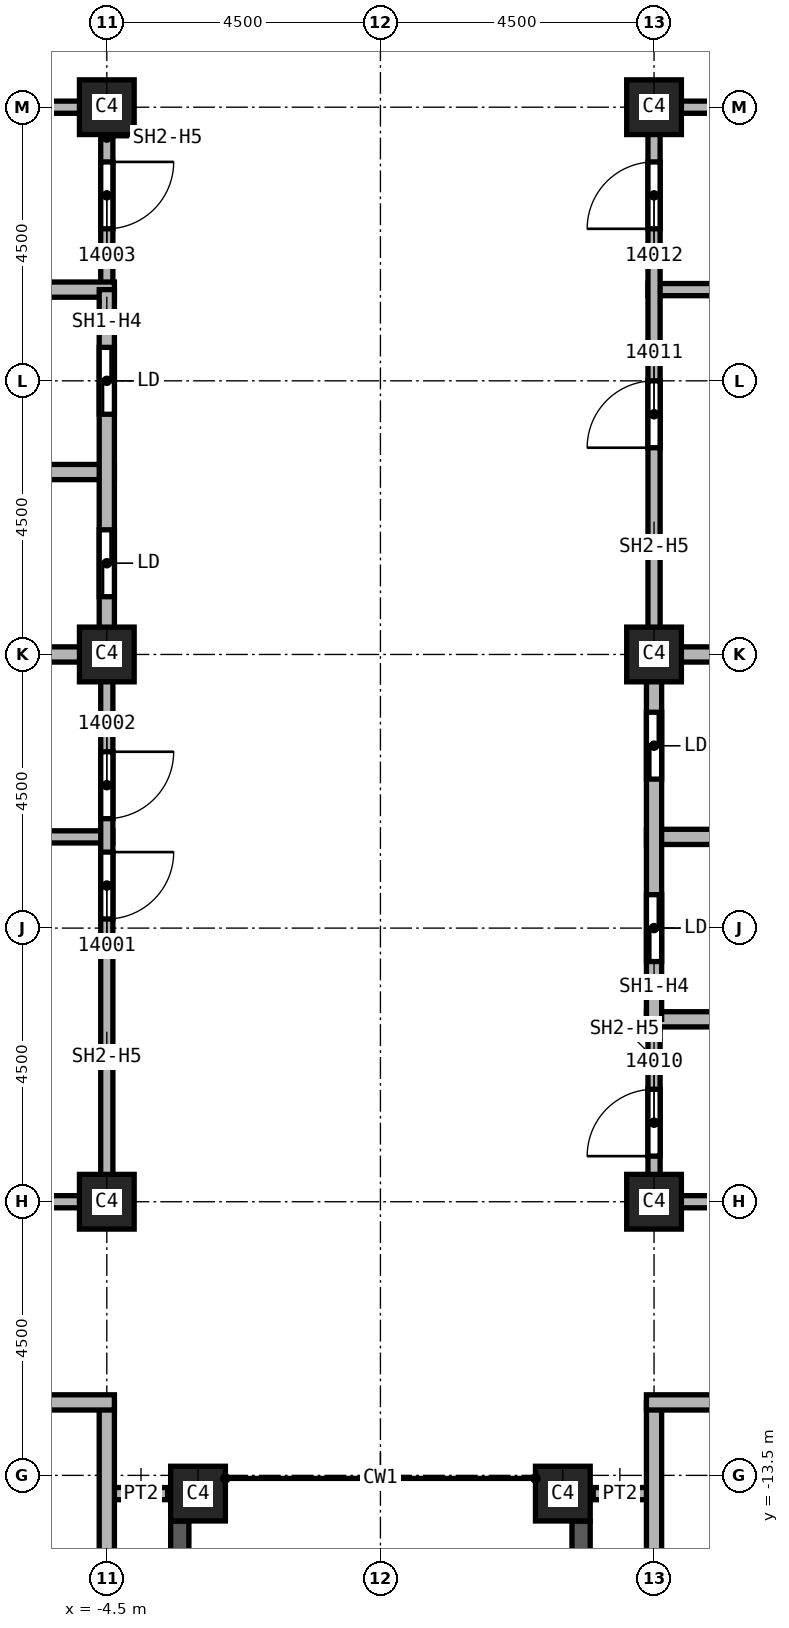
"""IFC4 building model, lengths in metres.
Left out: names, types, materials, properties, quantities, classifications, styles, units other than length and angle.
Written with IfcOpenShell. Run it as: python <this file> out.ifc"""

import sys

from ifc_helpers import new_model, si_unit, direction, frame, frame_2d, origin, origin_2d, place, context, subcontext, project, spatial, rectangle, extrude, element, fill, save


model = new_model("IFC4")
c1 = context("Model", 3, precision=1e-05, world=origin(), true_north=direction((0.0, 1.0)))
c2 = subcontext(c1, "Body", "Model", "MODEL_VIEW")
j1 = project(units=[si_unit("LENGTHUNIT", "METRE"), si_unit("PLANEANGLEUNIT", "RADIAN")], contexts=[c1])
p1 = place(None, origin())
s1 = spatial("IfcSite", under=j1, at=p1, CompositionType="ELEMENT")
p2 = place(p1, origin())
s2 = spatial("IfcBuilding", under=s1, at=p2, CompositionType="ELEMENT")
p3 = place(p2, frame((0.0, 0.0, 224.0)))
s3 = spatial("IfcBuildingStorey", under=s2, at=p3, CompositionType="ELEMENT", Elevation=224.0)
for number, where, z_axis, x_axis in (
    (1, (4.5, 0.0, 0.0), (0.0, 0.0, 1.0), (1.0, 0.0, 0.0)),
    (2, (4.5, 9.0, 0.0), (0.0, 0.0, 1.0), (1.0, 0.0, 0.0)),
    (3, (4.5, -9.0, 0.0), (0.0, 0.0, 1.0), (1.0, 0.0, 0.0)),
    (4, (-4.5, 0.0, 0.0), (0.0, 0.0, 1.0), (1.0, 0.0, 0.0)),
    (5, (-4.5, 9.0, 0.0), (0.0, 0.0, 1.0), (1.0, 0.0, 0.0)),
    (6, (-4.5, -9.0, 0.0), (0.0, 0.0, 1.0), (1.0, 0.0, 0.0)),
    (7, (3.0, -13.8, 0.0), (0.0, 0.0, 1.0), (1.0, 0.0, 0.0)),
    (8, (-3.0, -13.8, 0.0), (0.0, 0.0, 1.0), (1.0, 0.0, 0.0)),
):
    element("IfcColumn", number, at=place(p3, frame(where, z_axis=z_axis, x_axis=x_axis)), inside=s3, PredefinedType="COLUMN", context=c2, shape_type="SweptSolid", body=[
        extrude(rectangle(XDim=0.9, YDim=0.9, at=origin_2d()), origin(), (0.0, 0.0, 1.0), 3.72),
    ])
p4 = place(p3, frame((-3.3, -22.3, 0.0), z_axis=(0.0, 0.0, 1.0), x_axis=(0.0, 1.0, 0.0)))
e9 = element("IfcWall", 9, at=p4, inside=s3, PredefinedType="SOLIDWALL", context=c2, shape_type="SweptSolid", body=[
    extrude(rectangle(XDim=8.05, YDim=0.3, at=frame_2d((4.025, 0.0))), origin(), (0.0, 0.0, 1.0), 3.12),
])
p5 = place(p4, frame((0.812, 0.0, 0.8)))
e10 = element("IfcOpeningElement", 10, at=p5, cuts=e9, PredefinedType="OPENING", context=c2, shape_type="SweptSolid", body=[
    extrude(rectangle(XDim=2.4, YDim=1.95, at=frame_2d((1.2, 0.975))), frame((0.0, 0.15, 0.0), z_axis=(0.0, -1.0, 0.0), x_axis=(1.0, 0.0, 0.0)), (0.0, 0.0, 1.0), 0.3),
])
p6 = place(p4, frame((4.837, 0.0, 0.8)))
e11 = element("IfcOpeningElement", 11, at=p6, cuts=e9, PredefinedType="OPENING", context=c2, shape_type="SweptSolid", body=[
    extrude(rectangle(XDim=2.4, YDim=1.95, at=frame_2d((1.2, 0.975))), frame((0.0, 0.15, 0.0), z_axis=(0.0, -1.0, 0.0), x_axis=(1.0, 0.0, 0.0)), (0.0, 0.0, 1.0), 0.3),
])
p7 = place(p3, frame((3.3, -14.25, 0.0), z_axis=(0.0, 0.0, 1.0), x_axis=(0.0, -1.0, 0.0)))
e12 = element("IfcWall", 12, at=p7, inside=s3, PredefinedType="SOLIDWALL", context=c2, shape_type="SweptSolid", body=[
    extrude(rectangle(XDim=8.05, YDim=0.3, at=frame_2d((4.025, 0.0))), origin(), (0.0, 0.0, 1.0), 3.12),
])
p8 = place(p7, frame((0.812, 0.0, 0.8)))
e13 = element("IfcOpeningElement", 13, at=p8, cuts=e12, PredefinedType="OPENING", context=c2, shape_type="SweptSolid", body=[
    extrude(rectangle(XDim=2.4, YDim=1.95, at=frame_2d((1.2, 0.975))), frame((0.0, 0.15, 0.0), z_axis=(0.0, -1.0, 0.0), x_axis=(1.0, 0.0, 0.0)), (0.0, 0.0, 1.0), 0.3),
])
p9 = place(p7, frame((4.837, 0.0, 0.8)))
e14 = element("IfcOpeningElement", 14, at=p9, cuts=e12, PredefinedType="OPENING", context=c2, shape_type="SweptSolid", body=[
    extrude(rectangle(XDim=2.4, YDim=1.95, at=frame_2d((1.2, 0.975))), frame((0.0, 0.15, 0.0), z_axis=(0.0, -1.0, 0.0), x_axis=(1.0, 0.0, 0.0)), (0.0, 0.0, 1.0), 0.3),
])
for number, where, z_axis, x_axis in (
    (15, (-3.5, -13.8, 0.0), (0.0, 0.0, 1.0), (-1.0, 0.0, 0.0)),
    (16, (4.5, -13.8, 0.0), (0.0, 0.0, 1.0), (-1.0, 0.0, 0.0)),
):
    element("IfcWall", number, at=place(p3, frame(where, z_axis=z_axis, x_axis=x_axis)), inside=s3, PredefinedType="PARTITIONING", context=c2, shape_type="SweptSolid", body=[
        extrude(rectangle(XDim=1.0, YDim=0.2, at=frame_2d((0.5, 0.0))), origin(), (0.0, 0.0, 1.0), 3.72),
    ])
p10 = place(p3, frame((-7.625, -3.0, 0.0), z_axis=(0.0, 0.0, 1.0), x_axis=(1.0, 0.0, 0.0)))
e17 = element("IfcWall", 17, at=p10, inside=s3, PredefinedType="SOLIDWALL", context=c2, shape_type="SweptSolid", body=[
    extrude(rectangle(XDim=3.225, YDim=0.2, at=frame_2d((1.613, 0.0))), origin(), (0.0, 0.0, 1.0), 3.72),
])
for number, where, z_axis, x_axis in (
    (18, (-7.5, 9.0, 0.0), (0.0, 0.0, 1.0), (1.0, 0.0, 0.0)),
    (19, (-4.5, -9.0, 0.0), (0.0, 0.0, 1.0), (-1.0, 0.0, 0.0)),
):
    element("IfcWall", number, at=place(p3, frame(where, z_axis=z_axis, x_axis=x_axis)), inside=s3, PredefinedType="SOLIDWALL", context=c2, shape_type="SweptSolid", body=[
        extrude(rectangle(XDim=3.0, YDim=0.2, at=frame_2d((1.5, 0.0))), origin(), (0.0, 0.0, 1.0), 2.958),
    ])
p11 = place(p3, frame((-4.5, 0.0, 0.0), z_axis=(0.0, 0.0, 1.0), x_axis=(0.0, -1.0, 0.0)))
e20 = element("IfcWall", 20, at=p11, inside=s3, PredefinedType="SOLIDWALL", context=c2, shape_type="SweptSolid", body=[
    extrude(rectangle(XDim=9.1, YDim=0.2, at=frame_2d((4.55, 0.0))), origin(), (0.0, 0.0, 1.0), 2.958),
])
p12 = place(p11, frame((3.25, 0.0, 0.0)))
e21 = element("IfcOpeningElement", 21, at=p12, cuts=e20, PredefinedType="OPENING", context=c2, shape_type="SweptSolid", body=[
    extrude(rectangle(XDim=1.1, YDim=2.1, at=frame_2d((0.55, 1.05))), frame((0.0, 0.1, 0.0), z_axis=(0.0, -1.0, 0.0), x_axis=(1.0, 0.0, 0.0)), (0.0, 0.0, 1.0), 0.2),
])
p13 = place(p11, frame((1.6, 0.0, 0.0)))
e22 = element("IfcOpeningElement", 22, at=p13, cuts=e20, PredefinedType="OPENING", context=c2, shape_type="SweptSolid", body=[
    extrude(rectangle(XDim=1.1, YDim=2.1, at=frame_2d((0.55, 1.05))), frame((0.0, 0.1, 0.0), z_axis=(0.0, -1.0, 0.0), x_axis=(1.0, 0.0, 0.0)), (0.0, 0.0, 1.0), 0.2),
])
p14 = place(p3, frame((-4.5, 9.1, 0.0), z_axis=(0.0, 0.0, 1.0), x_axis=(0.0, -1.0, 0.0)))
e23 = element("IfcWall", 23, at=p14, inside=s3, PredefinedType="SOLIDWALL", context=c2, shape_type="SweptSolid", body=[
    extrude(rectangle(XDim=3.1, YDim=0.2, at=frame_2d((1.55, 0.0))), origin(), (0.0, 0.0, 1.0), 2.958),
])
p15 = place(p14, frame((1.0, 0.0, 0.0)))
e24 = element("IfcOpeningElement", 24, at=p15, cuts=e23, PredefinedType="OPENING", context=c2, shape_type="SweptSolid", body=[
    extrude(rectangle(XDim=1.1, YDim=2.1, at=frame_2d((0.55, 1.05))), frame((0.0, 0.1, 0.0), z_axis=(0.0, -1.0, 0.0), x_axis=(1.0, 0.0, 0.0)), (0.0, 0.0, 1.0), 0.2),
])
p16 = place(p3, frame((4.4, 6.0, 0.0), z_axis=(0.0, 0.0, 1.0), x_axis=(1.0, 0.0, 0.0)))
e25 = element("IfcWall", 25, at=p16, inside=s3, PredefinedType="SOLIDWALL", context=c2, shape_type="SweptSolid", body=[
    extrude(rectangle(XDim=3.2, YDim=0.2, at=frame_2d((1.6, 0.0))), origin(), (0.0, 0.0, 1.0), 3.72),
])
p17 = place(p3, frame((4.5, -9.1, 0.0), z_axis=(0.0, 0.0, 1.0), x_axis=(0.0, 1.0, 0.0)))
e26 = element("IfcWall", 26, at=p17, inside=s3, PredefinedType="SOLIDWALL", context=c2, shape_type="SweptSolid", body=[
    extrude(rectangle(XDim=3.1, YDim=0.2, at=frame_2d((1.55, 0.0))), origin(), (0.0, 0.0, 1.0), 2.958),
])
p18 = place(p17, frame((0.85, 0.0, 0.0)))
e27 = element("IfcOpeningElement", 27, at=p18, cuts=e26, PredefinedType="OPENING", context=c2, shape_type="SweptSolid", body=[
    extrude(rectangle(XDim=1.1, YDim=2.1, at=frame_2d((0.55, 1.05))), frame((0.0, 0.1, 0.0), z_axis=(0.0, -1.0, 0.0), x_axis=(1.0, 0.0, 0.0)), (0.0, 0.0, 1.0), 0.2),
])
p19 = place(p3, frame((4.5, 0.0, 0.0), z_axis=(0.0, 0.0, 1.0), x_axis=(0.0, 1.0, 0.0)))
e28 = element("IfcWall", 28, at=p19, inside=s3, PredefinedType="SOLIDWALL", context=c2, shape_type="SweptSolid", body=[
    extrude(rectangle(XDim=9.1, YDim=0.2, at=frame_2d((4.55, 0.0))), origin(), (0.0, 0.0, 1.0), 2.958),
])
p20 = place(p19, frame((3.4, 0.0, 0.0)))
e29 = element("IfcOpeningElement", 29, at=p20, cuts=e28, PredefinedType="OPENING", context=c2, shape_type="SweptSolid", body=[
    extrude(rectangle(XDim=1.1, YDim=2.1, at=frame_2d((0.55, 1.05))), frame((0.0, 0.1, 0.0), z_axis=(0.0, -1.0, 0.0), x_axis=(1.0, 0.0, 0.0)), (0.0, 0.0, 1.0), 0.2),
])
p21 = place(p19, frame((7.0, 0.0, 0.0)))
e30 = element("IfcOpeningElement", 30, at=p21, cuts=e28, PredefinedType="OPENING", context=c2, shape_type="SweptSolid", body=[
    extrude(rectangle(XDim=1.1, YDim=2.1, at=frame_2d((0.55, 1.05))), frame((0.0, 0.1, 0.0), z_axis=(0.0, -1.0, 0.0), x_axis=(1.0, 0.0, 0.0)), (0.0, 0.0, 1.0), 0.2),
])
for number, where, z_axis, x_axis in (
    (31, (4.5, 9.0, 0.0), (0.0, 0.0, 1.0), (1.0, 0.0, 0.0)),
    (32, (7.5, -9.0, 0.0), (0.0, 0.0, 1.0), (-1.0, 0.0, 0.0)),
):
    element("IfcWall", number, at=place(p3, frame(where, z_axis=z_axis, x_axis=x_axis)), inside=s3, PredefinedType="SOLIDWALL", context=c2, shape_type="SweptSolid", body=[
        extrude(rectangle(XDim=3.0, YDim=0.2, at=frame_2d((1.5, 0.0))), origin(), (0.0, 0.0, 1.0), 2.958),
    ])
p22 = place(p3, frame((-13.625, 3.0, 0.0), z_axis=(0.0, 0.0, 1.0), x_axis=(1.0, 0.0, 0.0)))
e33 = element("IfcWall", 33, at=p22, inside=s3, PredefinedType="SOLIDWALL", context=c2, shape_type="SweptSolid", body=[
    extrude(rectangle(XDim=9.25, YDim=0.25, at=frame_2d((4.625, 0.0))), origin(), (0.0, 0.0, 1.0), 3.72),
])
p23 = place(p22, frame((3.25, 0.0, 0.0)))
e34 = element("IfcOpeningElement", 34, at=p23, cuts=e33, PredefinedType="OPENING", context=c2, shape_type="SweptSolid", body=[
    extrude(rectangle(XDim=1.1, YDim=2.1, at=frame_2d((0.55, 1.05))), frame((0.0, 0.125, 0.0), z_axis=(0.0, -1.0, 0.0), x_axis=(1.0, 0.0, 0.0)), (0.0, 0.0, 1.0), 0.25),
])
for number, where, z_axis, x_axis in (
    (35, (-7.625, 0.0, 0.0), (0.0, 0.0, 1.0), (1.0, 0.0, 0.0)),
    (36, (-7.625, 6.0, 0.0), (0.0, 0.0, 1.0), (1.0, 0.0, 0.0)),
):
    element("IfcWall", number, at=place(p3, frame(where, z_axis=z_axis, x_axis=x_axis)), inside=s3, PredefinedType="SOLIDWALL", context=c2, shape_type="SweptSolid", body=[
        extrude(rectangle(XDim=3.25, YDim=0.25, at=frame_2d((1.625, 0.0))), origin(), (0.0, 0.0, 1.0), 3.72),
    ])
p24 = place(p3, frame((-4.5, 6.0, 0.0), z_axis=(0.0, 0.0, 1.0), x_axis=(0.0, -1.0, 0.0)))
e37 = element("IfcWall", 37, at=p24, inside=s3, PredefinedType="SOLIDWALL", context=c2, shape_type="SweptSolid", body=[
    extrude(rectangle(XDim=6.0, YDim=0.25, at=frame_2d((3.0, 0.0))), origin(), (0.0, 0.0, 1.0), 2.958),
])
p25 = place(p24, frame((3.95, 0.0, 0.0)))
e38 = element("IfcOpeningElement", 38, at=p25, cuts=e37, PredefinedType="OPENING", context=c2, shape_type="SweptSolid", body=[
    extrude(rectangle(XDim=1.1, YDim=2.1, at=frame_2d((0.55, 1.05))), frame((0.0, 0.125, 0.0), z_axis=(0.0, -1.0, 0.0), x_axis=(1.0, 0.0, 0.0)), (0.0, 0.0, 1.0), 0.25),
])
p26 = place(p24, frame((0.95, 0.0, 0.0)))
e39 = element("IfcOpeningElement", 39, at=p26, cuts=e37, PredefinedType="OPENING", context=c2, shape_type="SweptSolid", body=[
    extrude(rectangle(XDim=1.1, YDim=2.1, at=frame_2d((0.55, 1.05))), frame((0.0, 0.125, 0.0), z_axis=(0.0, -1.0, 0.0), x_axis=(1.0, 0.0, 0.0)), (0.0, 0.0, 1.0), 0.25),
])
p27 = place(p3, frame((4.375, -6.0, 0.0), z_axis=(0.0, 0.0, 1.0), x_axis=(1.0, 0.0, 0.0)))
e40 = element("IfcWall", 40, at=p27, inside=s3, PredefinedType="SOLIDWALL", context=c2, shape_type="SweptSolid", body=[
    extrude(rectangle(XDim=3.25, YDim=0.25, at=frame_2d((1.625, 0.0))), origin(), (0.0, 0.0, 1.0), 3.72),
])
p28 = place(p3, frame((4.375, -3.0, 0.0), z_axis=(0.0, 0.0, 1.0), x_axis=(1.0, 0.0, 0.0)))
e41 = element("IfcWall", 41, at=p28, inside=s3, PredefinedType="SOLIDWALL", context=c2, shape_type="SweptSolid", body=[
    extrude(rectangle(XDim=9.25, YDim=0.25, at=frame_2d((4.625, 0.0))), origin(), (0.0, 0.0, 1.0), 3.72),
])
p29 = place(p28, frame((3.375, 0.0, 0.0)))
e42 = element("IfcOpeningElement", 42, at=p29, cuts=e41, PredefinedType="OPENING", context=c2, shape_type="SweptSolid", body=[
    extrude(rectangle(XDim=1.1, YDim=2.1, at=frame_2d((0.55, 1.05))), frame((0.0, 0.125, 0.0), z_axis=(0.0, -1.0, 0.0), x_axis=(1.0, 0.0, 0.0)), (0.0, 0.0, 1.0), 0.25),
])
p30 = place(p3, frame((4.375, 0.0, 0.0), z_axis=(0.0, 0.0, 1.0), x_axis=(1.0, 0.0, 0.0)))
e43 = element("IfcWall", 43, at=p30, inside=s3, PredefinedType="SOLIDWALL", context=c2, shape_type="SweptSolid", body=[
    extrude(rectangle(XDim=3.25, YDim=0.25, at=frame_2d((1.625, 0.0))), origin(), (0.0, 0.0, 1.0), 3.72),
])
p31 = place(p3, frame((4.5, -6.0, 0.0), z_axis=(0.0, 0.0, 1.0), x_axis=(0.0, 1.0, 0.0)))
e44 = element("IfcWall", 44, at=p31, inside=s3, PredefinedType="SOLIDWALL", context=c2, shape_type="SweptSolid", body=[
    extrude(rectangle(XDim=6.0, YDim=0.25, at=frame_2d((3.0, 0.0))), origin(), (0.0, 0.0, 1.0), 2.958),
])
p32 = place(p31, frame((0.95, 0.0, 0.0)))
e45 = element("IfcOpeningElement", 45, at=p32, cuts=e44, PredefinedType="OPENING", context=c2, shape_type="SweptSolid", body=[
    extrude(rectangle(XDim=1.1, YDim=2.1, at=frame_2d((0.55, 1.05))), frame((0.0, 0.125, 0.0), z_axis=(0.0, -1.0, 0.0), x_axis=(1.0, 0.0, 0.0)), (0.0, 0.0, 1.0), 0.25),
])
p33 = place(p31, frame((3.95, 0.0, 0.0)))
e46 = element("IfcOpeningElement", 46, at=p33, cuts=e44, PredefinedType="OPENING", context=c2, shape_type="SweptSolid", body=[
    extrude(rectangle(XDim=1.1, YDim=2.1, at=frame_2d((0.55, 1.05))), frame((0.0, 0.125, 0.0), z_axis=(0.0, -1.0, 0.0), x_axis=(1.0, 0.0, 0.0)), (0.0, 0.0, 1.0), 0.25),
])
p34 = place(p3, frame((-4.5, -12.3, 0.0), z_axis=(0.0, 0.0, 1.0), x_axis=(0.0, -1.0, 0.0)))
e47 = element("IfcWall", 47, at=p34, inside=s3, PredefinedType="SOLIDWALL", context=c2, shape_type="SweptSolid", body=[
    extrude(rectangle(XDim=4.625, YDim=0.25, at=frame_2d((2.312, 0.0))), origin(), (0.0, 0.0, 1.0), 3.72),
])
p35 = place(p3, frame((-4.375, -12.3, 0.0), z_axis=(0.0, 0.0, 1.0), x_axis=(-1.0, 0.0, 0.0)))
e48 = element("IfcWall", 48, at=p35, inside=s3, PredefinedType="SOLIDWALL", context=c2, shape_type="SweptSolid", body=[
    extrude(rectangle(XDim=9.25, YDim=0.25, at=frame_2d((4.625, 0.0))), origin(), (0.0, 0.0, 1.0), 3.72),
])
p36 = place(p35, frame((7.2, 0.0, 0.0)))
e49 = element("IfcOpeningElement", 49, at=p36, cuts=e48, PredefinedType="OPENING", context=c2, shape_type="SweptSolid", body=[
    extrude(rectangle(XDim=1.2, YDim=2.1, at=frame_2d((0.6, 1.05))), frame((0.0, 0.125, 0.0), z_axis=(0.0, -1.0, 0.0), x_axis=(1.0, 0.0, 0.0)), (0.0, 0.0, 1.0), 0.25),
])
p37 = place(p3, frame((4.5, -16.8, 0.0), z_axis=(0.0, 0.0, 1.0), x_axis=(0.0, 1.0, 0.0)))
e50 = element("IfcWall", 50, at=p37, inside=s3, PredefinedType="SOLIDWALL", context=c2, shape_type="SweptSolid", body=[
    extrude(rectangle(XDim=4.5, YDim=0.25, at=frame_2d((2.25, 0.0))), origin(), (0.0, 0.0, 1.0), 3.72),
])
p38 = place(p3, frame((13.625, -12.3, 0.0), z_axis=(0.0, 0.0, 1.0), x_axis=(-1.0, 0.0, 0.0)))
e51 = element("IfcWall", 51, at=p38, inside=s3, PredefinedType="SOLIDWALL", context=c2, shape_type="SweptSolid", body=[
    extrude(rectangle(XDim=9.25, YDim=0.25, at=frame_2d((4.625, 0.0))), origin(), (0.0, 0.0, 1.0), 3.72),
])
p39 = place(p38, frame((0.85, 0.0, 0.0)))
e52 = element("IfcOpeningElement", 52, at=p39, cuts=e51, PredefinedType="OPENING", context=c2, shape_type="SweptSolid", body=[
    extrude(rectangle(XDim=1.2, YDim=2.1, at=frame_2d((0.6, 1.05))), frame((0.0, 0.125, 0.0), z_axis=(0.0, -1.0, 0.0), x_axis=(1.0, 0.0, 0.0)), (0.0, 0.0, 1.0), 0.25),
])
p40 = place(p12, origin())
e53 = element("IfcDoor", 53, at=p40, inside=s3, OperationType="SINGLE_SWING_RIGHT", PredefinedType="DOOR", context=c2, shape_type="SweptSolid", body=[
    extrude(rectangle(XDim=1.1, YDim=2.1, at=frame_2d((0.55, 1.05))), frame((0.0, 0.025, 0.0), z_axis=(0.0, -1.0, 0.0), x_axis=(1.0, 0.0, 0.0)), (0.0, 0.0, 1.0), 0.05),
])
fill(e21, e53)
p41 = place(p13, origin())
e54 = element("IfcDoor", 54, at=p41, inside=s3, OperationType="SINGLE_SWING_LEFT", PredefinedType="DOOR", context=c2, shape_type="SweptSolid", body=[
    extrude(rectangle(XDim=1.1, YDim=2.1, at=frame_2d((0.55, 1.05))), frame((0.0, 0.025, 0.0), z_axis=(0.0, -1.0, 0.0), x_axis=(1.0, 0.0, 0.0)), (0.0, 0.0, 1.0), 0.05),
])
fill(e22, e54)
p42 = place(p15, origin())
e55 = element("IfcDoor", 55, at=p42, inside=s3, OperationType="SINGLE_SWING_RIGHT", PredefinedType="DOOR", context=c2, shape_type="SweptSolid", body=[
    extrude(rectangle(XDim=1.1, YDim=2.1, at=frame_2d((0.55, 1.05))), frame((0.0, 0.025, 0.0), z_axis=(0.0, -1.0, 0.0), x_axis=(1.0, 0.0, 0.0)), (0.0, 0.0, 1.0), 0.05),
])
fill(e24, e55)
p43 = place(p18, origin())
e56 = element("IfcDoor", 56, at=p43, inside=s3, OperationType="SINGLE_SWING_LEFT", PredefinedType="DOOR", context=c2, shape_type="SweptSolid", body=[
    extrude(rectangle(XDim=1.1, YDim=2.1, at=frame_2d((0.55, 1.05))), frame((0.0, 0.025, 0.0), z_axis=(0.0, -1.0, 0.0), x_axis=(1.0, 0.0, 0.0)), (0.0, 0.0, 1.0), 0.05),
])
fill(e27, e56)
p44 = place(p20, origin())
e57 = element("IfcDoor", 57, at=p44, inside=s3, OperationType="SINGLE_SWING_RIGHT", PredefinedType="DOOR", context=c2, shape_type="SweptSolid", body=[
    extrude(rectangle(XDim=1.1, YDim=2.1, at=frame_2d((0.55, 1.05))), frame((0.0, 0.025, 0.0), z_axis=(0.0, -1.0, 0.0), x_axis=(1.0, 0.0, 0.0)), (0.0, 0.0, 1.0), 0.05),
])
fill(e29, e57)
p45 = place(p21, origin())
e58 = element("IfcDoor", 58, at=p45, inside=s3, OperationType="SINGLE_SWING_LEFT", PredefinedType="DOOR", context=c2, shape_type="SweptSolid", body=[
    extrude(rectangle(XDim=1.1, YDim=2.1, at=frame_2d((0.55, 1.05))), frame((0.0, 0.025, 0.0), z_axis=(0.0, -1.0, 0.0), x_axis=(1.0, 0.0, 0.0)), (0.0, 0.0, 1.0), 0.05),
])
fill(e30, e58)
p46 = place(p25, origin())
e59 = element("IfcDoor", 59, at=p46, inside=s3, OperationType="SLIDING_TO_LEFT", PredefinedType="DOOR", context=c2, shape_type="SweptSolid", body=[
    extrude(rectangle(XDim=1.1, YDim=2.1, at=frame_2d((0.55, 1.05))), frame((0.0, 0.025, 0.0), z_axis=(0.0, -1.0, 0.0), x_axis=(1.0, 0.0, 0.0)), (0.0, 0.0, 1.0), 0.05),
])
fill(e38, e59)
p47 = place(p26, origin())
e60 = element("IfcDoor", 60, at=p47, inside=s3, OperationType="SLIDING_TO_LEFT", PredefinedType="DOOR", context=c2, shape_type="SweptSolid", body=[
    extrude(rectangle(XDim=1.1, YDim=2.1, at=frame_2d((0.55, 1.05))), frame((0.0, 0.025, 0.0), z_axis=(0.0, -1.0, 0.0), x_axis=(1.0, 0.0, 0.0)), (0.0, 0.0, 1.0), 0.05),
])
fill(e39, e60)
p48 = place(p32, origin())
e61 = element("IfcDoor", 61, at=p48, inside=s3, OperationType="SLIDING_TO_LEFT", PredefinedType="DOOR", context=c2, shape_type="SweptSolid", body=[
    extrude(rectangle(XDim=1.1, YDim=2.1, at=frame_2d((0.55, 1.05))), frame((0.0, 0.025, 0.0), z_axis=(0.0, -1.0, 0.0), x_axis=(1.0, 0.0, 0.0)), (0.0, 0.0, 1.0), 0.05),
])
fill(e45, e61)
p49 = place(p33, origin())
e62 = element("IfcDoor", 62, at=p49, inside=s3, OperationType="SLIDING_TO_LEFT", PredefinedType="DOOR", context=c2, shape_type="SweptSolid", body=[
    extrude(rectangle(XDim=1.1, YDim=2.1, at=frame_2d((0.55, 1.05))), frame((0.0, 0.025, 0.0), z_axis=(0.0, -1.0, 0.0), x_axis=(1.0, 0.0, 0.0)), (0.0, 0.0, 1.0), 0.05),
])
fill(e46, e62)
save(model, sys.argv[1])
